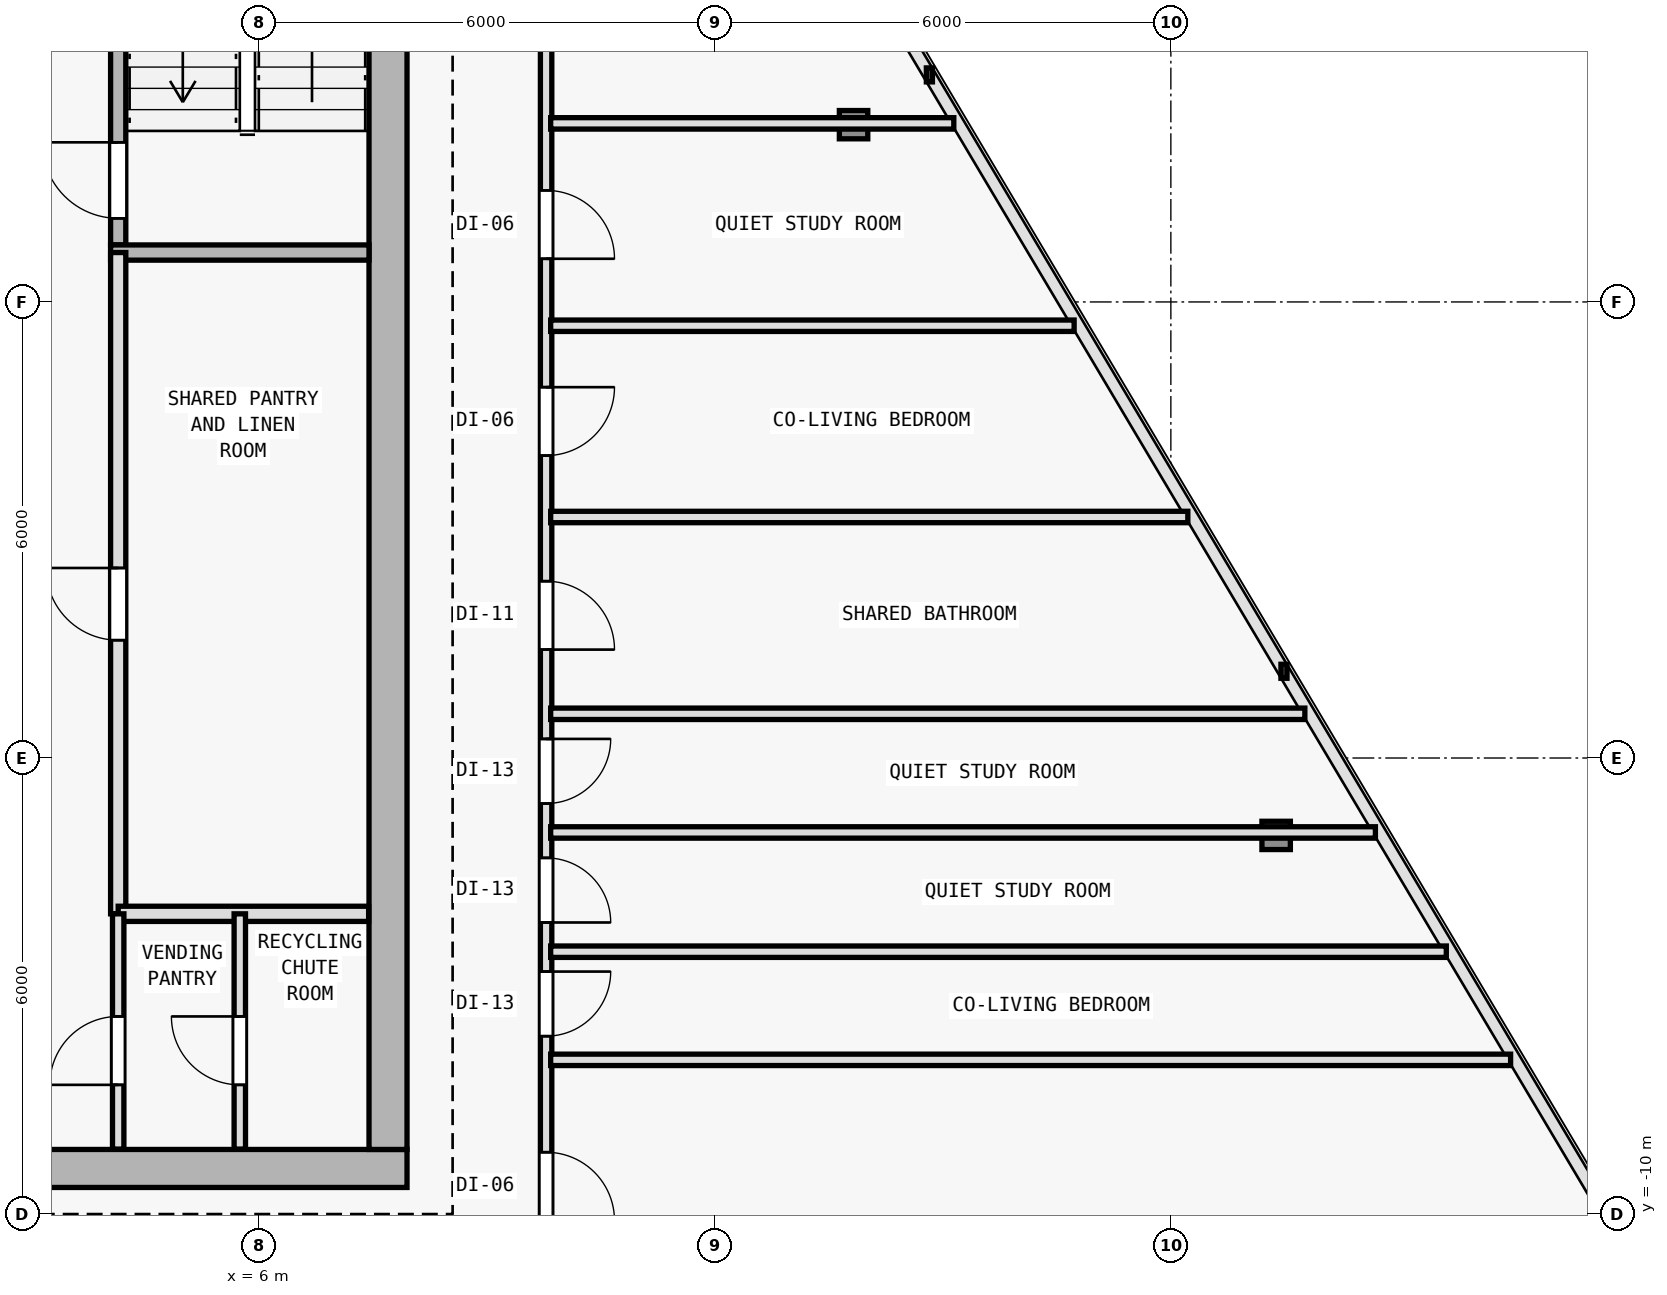
"""IFC4 building model, lengths in metres.
Left out: names, types, materials, properties, quantities, classifications, styles, units other than length and angle.
Written with IfcOpenShell. Run it as: python <this file> out.ifc"""

import sys

from ifc_helpers import new_model, si_unit, direction, frame, frame_2d, origin, origin_2d, place, context, subcontext, project, spatial, rectangle, i_section, extrude, element, fill, save


model = new_model("IFC4")
c1 = context("Model", 3, precision=1e-05, world=origin(), true_north=direction((0.0, 1.0)))
c2 = subcontext(c1, "Body", "Model", "MODEL_VIEW")
j1 = project(units=[si_unit("LENGTHUNIT", "METRE"), si_unit("PLANEANGLEUNIT", "RADIAN")], contexts=[c1])
p1 = place(None, origin())
s1 = spatial("IfcSite", under=j1, at=p1, CompositionType="ELEMENT")
p2 = place(p1, origin())
s2 = spatial("IfcBuilding", under=s1, at=p2, CompositionType="ELEMENT")
p3 = place(p2, frame((0.0, 0.0, 258.0)))
s3 = spatial("IfcBuildingStorey", under=s2, at=p3, CompositionType="ELEMENT", Elevation=258.0)
for number, where, z_axis, x_axis in (
    (1, (7.7, -9.4, 0.0), (0.0, 0.0, 1.0), (1.0, 0.0, 0.0)),
    (2, (7.7, 0.4, 0.0), (0.0, 0.0, 1.0), (1.0, 0.0, 0.0)),
):
    element("IfcColumn", number, at=place(p3, frame(where, z_axis=z_axis, x_axis=x_axis)), inside=s3, PredefinedType="COLUMN", context=c2, shape_type="SweptSolid", body=[
        extrude(i_section(OverallWidth=0.374, OverallDepth=0.372, WebThickness=0.012, FlangeThickness=0.02, FilletRadius=0.015, at=origin_2d()), origin(), (0.0, 0.0, 1.0), 3.6),
    ])
p4 = place(p3, frame((19.385, -5.018, 0.006), z_axis=(-0.026107436898, 0.021620221181, 0.999425318758), x_axis=(-0.637813971185, -0.770190455771, 0.0)))
e3 = element("IfcColumn", 3, at=p4, inside=s3, PredefinedType="COLUMN", context=c2, shape_type="SweptSolid", body=[
    extrude(i_section(OverallWidth=0.374, OverallDepth=0.372, WebThickness=0.012, FlangeThickness=0.02, FilletRadius=0.015, at=origin_2d()), origin(), (0.0, 0.0, 1.0), 3.591),
])
p5 = place(p3, frame((13.825, 4.332, 0.006), z_axis=(-0.018907326549, 0.00952167524, 0.999775900241), x_axis=(-0.449781931574, -0.893138406984, 0.0)))
e4 = element("IfcColumn", 4, at=p5, inside=s3, PredefinedType="COLUMN", context=c2, shape_type="SweptSolid", body=[
    extrude(i_section(OverallWidth=0.374, OverallDepth=0.372, WebThickness=0.012, FlangeThickness=0.02, FilletRadius=0.015, at=origin_2d()), origin(), (0.0, 0.0, 1.0), 3.59),
])
p6 = place(p3, frame((-7.95, -9.4, 0.0), z_axis=(0.0, 0.0, 1.0), x_axis=(1.0, 0.0, 0.0)))
e5 = element("IfcWall", 5, at=p6, inside=s3, PredefinedType="SHEAR", context=c2, shape_type="SweptSolid", body=[
    extrude(rectangle(XDim=15.9, YDim=0.5, at=frame_2d((7.95, 0.0))), origin(), (0.0, 0.0, 1.0), 3.35),
])
p7 = place(p6, frame((9.6, 0.0, 0.0)))
e6 = element("IfcOpeningElement", 6, at=p7, cuts=e5, PredefinedType="OPENING", context=c2, shape_type="SweptSolid", body=[
    extrude(rectangle(XDim=1.5, YDim=2.2, at=frame_2d((0.75, 1.1))), frame((0.0, 0.26, 0.0), z_axis=(0.0, -1.0, 0.0), x_axis=(1.0, 0.0, 0.0)), (0.0, 0.0, 1.0), 0.52),
])
p8 = place(p3, frame((7.7, 9.95, 0.0), z_axis=(0.0, 0.0, 1.0), x_axis=(0.0, -1.0, 0.0)))
e7 = element("IfcWall", 7, at=p8, inside=s3, PredefinedType="SHEAR", context=c2, shape_type="SweptSolid", body=[
    extrude(rectangle(XDim=19.1, YDim=0.5, at=frame_2d((9.55, 0.0))), origin(), (0.0, 0.0, 1.0), 3.35),
])
p9 = place(p3, frame((4.15, 2.75, 0.0), z_axis=(0.0, 0.0, 1.0), x_axis=(0.0, 1.0, 0.0)))
e8 = element("IfcWall", 8, at=p9, inside=s3, PredefinedType="SOLIDWALL", context=c2, shape_type="SweptSolid", body=[
    extrude(rectangle(XDim=7.2, YDim=0.2, at=frame_2d((3.6, 0.0))), origin(), (0.0, 0.0, 1.0), 3.35),
])
p10 = place(p9, frame((0.35, 0.0, 0.0)))
e9 = element("IfcOpeningElement", 9, at=p10, cuts=e8, PredefinedType="OPENING", context=c2, shape_type="SweptSolid", body=[
    extrude(rectangle(XDim=1.0, YDim=2.15, at=frame_2d((0.5, 1.075))), frame((0.0, 0.11, 0.0), z_axis=(0.0, -1.0, 0.0), x_axis=(1.0, 0.0, 0.0)), (0.0, 0.0, 1.0), 0.22),
])
p11 = place(p3, frame((4.05, 2.65, 0.0), z_axis=(0.0, 0.0, 1.0), x_axis=(1.0, 0.0, 0.0)))
e10 = element("IfcWall", 10, at=p11, inside=s3, PredefinedType="SOLIDWALL", context=c2, shape_type="SweptSolid", body=[
    extrude(rectangle(XDim=3.4, YDim=0.2, at=frame_2d((1.7, 0.0))), origin(), (0.0, 0.0, 1.0), 3.35),
])
p12 = place(p3, frame((4.15, -6.05, 0.0), z_axis=(0.0, 0.0, 1.0), x_axis=(0.0, 1.0, 0.0)))
e11 = element("IfcWall", 11, at=p12, inside=s3, PredefinedType="SOLIDWALL", context=c2, shape_type="SweptSolid", body=[
    extrude(rectangle(XDim=8.7, YDim=0.2, at=frame_2d((4.35, 0.0))), origin(), (0.0, 0.0, 1.0), 3.35),
])
p13 = place(p12, frame((3.6, 0.0, 0.0)))
e12 = element("IfcOpeningElement", 12, at=p13, cuts=e11, PredefinedType="OPENING", context=c2, shape_type="SweptSolid", body=[
    extrude(rectangle(XDim=0.95, YDim=2.1, at=frame_2d((0.475, 1.05))), frame((0.0, 0.11, 0.0), z_axis=(0.0, -1.0, 0.0), x_axis=(1.0, 0.0, 0.0)), (0.0, 0.0, 1.0), 0.22),
])
p14 = place(p3, frame((4.15, -6.05, 0.0), z_axis=(0.0, 0.0, 1.0), x_axis=(1.0, 0.0, 0.0)))
e13 = element("IfcWall", 13, at=p14, inside=s3, PredefinedType="SOLIDWALL", context=c2, shape_type="SweptSolid", body=[
    extrude(rectangle(XDim=3.295, YDim=0.2, at=frame_2d((1.647, 0.0))), origin(), (0.0, 0.0, 1.0), 3.35),
])
p15 = place(p3, frame((4.15, -9.145, 0.0), z_axis=(0.0, 0.0, 1.0), x_axis=(0.0, 1.0, 0.0)))
e14 = element("IfcWall", 14, at=p15, inside=s3, PredefinedType="PARTITIONING", context=c2, shape_type="SweptSolid", body=[
    extrude(rectangle(XDim=3.095, YDim=0.15, at=frame_2d((1.547, 0.0))), origin(), (0.0, 0.0, 1.0), 3.35),
])
p16 = place(p15, frame((0.845, 0.0, 0.0)))
e15 = element("IfcOpeningElement", 15, at=p16, cuts=e14, PredefinedType="OPENING", context=c2, shape_type="SweptSolid", body=[
    extrude(rectangle(XDim=0.9, YDim=2.1, at=frame_2d((0.45, 1.05))), frame((0.0, 0.085, 0.0), z_axis=(0.0, -1.0, 0.0), x_axis=(1.0, 0.0, 0.0)), (0.0, 0.0, 1.0), 0.17),
])
p17 = place(p3, frame((5.75, -9.145, 0.0), z_axis=(0.0, 0.0, 1.0), x_axis=(0.0, 1.0, 0.0)))
e16 = element("IfcWall", 16, at=p17, inside=s3, PredefinedType="PARTITIONING", context=c2, shape_type="SweptSolid", body=[
    extrude(rectangle(XDim=3.095, YDim=0.15, at=frame_2d((1.547, 0.0))), origin(), (0.0, 0.0, 1.0), 3.35),
])
p18 = place(p17, frame((0.845, 0.0, 0.0)))
e17 = element("IfcOpeningElement", 17, at=p18, cuts=e16, PredefinedType="OPENING", context=c2, shape_type="SweptSolid", body=[
    extrude(rectangle(XDim=0.9, YDim=2.1, at=frame_2d((0.45, 1.05))), frame((0.0, 0.085, 0.0), z_axis=(0.0, -1.0, 0.0), x_axis=(1.0, 0.0, 0.0)), (0.0, 0.0, 1.0), 0.17),
])
p19 = place(p3, frame((9.78, 8.226, 0.0), z_axis=(0.0, 0.0, 1.0), x_axis=(0.0, -1.0, 0.0)))
e18 = element("IfcWall", 18, at=p19, inside=s3, PredefinedType="PARTITIONING", context=c2, shape_type="SweptSolid", body=[
    extrude(rectangle(XDim=19.706, YDim=0.15, at=frame_2d((9.853, 0.0))), origin(), (0.0, 0.0, 1.0), 2.725),
])
p20 = place(p19, frame((17.412, 0.0, 0.0)))
e19 = element("IfcOpeningElement", 19, at=p20, cuts=e18, PredefinedType="OPENING", context=c2, shape_type="SweptSolid", body=[
    extrude(rectangle(XDim=0.9, YDim=2.1, at=frame_2d((0.45, 1.05))), frame((0.0, 0.085, 0.0), z_axis=(0.0, -1.0, 0.0), x_axis=(1.0, 0.0, 0.0)), (0.0, 0.0, 1.0), 0.17),
])
p21 = place(p19, frame((15.036, 0.0, 0.0)))
e20 = element("IfcOpeningElement", 20, at=p21, cuts=e18, PredefinedType="OPENING", context=c2, shape_type="SweptSolid", body=[
    extrude(rectangle(XDim=0.85, YDim=2.1, at=frame_2d((0.425, 1.05))), frame((0.0, 0.085, 0.0), z_axis=(0.0, -1.0, 0.0), x_axis=(1.0, 0.0, 0.0)), (0.0, 0.0, 1.0), 0.17),
])
p22 = place(p19, frame((13.54, 0.0, 0.0)))
e21 = element("IfcOpeningElement", 21, at=p22, cuts=e18, PredefinedType="OPENING", context=c2, shape_type="SweptSolid", body=[
    extrude(rectangle(XDim=0.85, YDim=2.1, at=frame_2d((0.425, 1.05))), frame((0.0, 0.085, 0.0), z_axis=(0.0, -1.0, 0.0), x_axis=(1.0, 0.0, 0.0)), (0.0, 0.0, 1.0), 0.17),
])
p23 = place(p19, frame((11.975, 0.0, 0.0)))
e22 = element("IfcOpeningElement", 22, at=p23, cuts=e18, PredefinedType="OPENING", context=c2, shape_type="SweptSolid", body=[
    extrude(rectangle(XDim=0.85, YDim=2.1, at=frame_2d((0.425, 1.05))), frame((0.0, 0.085, 0.0), z_axis=(0.0, -1.0, 0.0), x_axis=(1.0, 0.0, 0.0)), (0.0, 0.0, 1.0), 0.17),
])
p24 = place(p19, frame((9.9, 0.0, 0.0)))
e23 = element("IfcOpeningElement", 23, at=p24, cuts=e18, PredefinedType="OPENING", context=c2, shape_type="SweptSolid", body=[
    extrude(rectangle(XDim=0.9, YDim=2.1, at=frame_2d((0.45, 1.05))), frame((0.0, 0.085, 0.0), z_axis=(0.0, -1.0, 0.0), x_axis=(1.0, 0.0, 0.0)), (0.0, 0.0, 1.0), 0.17),
])
p25 = place(p19, frame((7.347, 0.0, 0.0)))
e24 = element("IfcOpeningElement", 24, at=p25, cuts=e18, PredefinedType="OPENING", context=c2, shape_type="SweptSolid", body=[
    extrude(rectangle(XDim=0.9, YDim=2.1, at=frame_2d((0.45, 1.05))), frame((0.0, 0.085, 0.0), z_axis=(0.0, -1.0, 0.0), x_axis=(1.0, 0.0, 0.0)), (0.0, 0.0, 1.0), 0.17),
])
p26 = place(p19, frame((4.758, 0.0, 0.0)))
e25 = element("IfcOpeningElement", 25, at=p26, cuts=e18, PredefinedType="OPENING", context=c2, shape_type="SweptSolid", body=[
    extrude(rectangle(XDim=0.9, YDim=2.1, at=frame_2d((0.45, 1.05))), frame((0.0, 0.085, 0.0), z_axis=(0.0, -1.0, 0.0), x_axis=(1.0, 0.0, 0.0)), (0.0, 0.0, 1.0), 0.17),
])
p27 = place(p3, frame((9.84, -4.979, 0.0), z_axis=(0.0, 0.0, 1.0), x_axis=(1.0, 0.0, 0.0)))
e26 = element("IfcWall", 26, at=p27, inside=s3, PredefinedType="PARTITIONING", context=c2, shape_type="SweptSolid", body=[
    extrude(rectangle(XDim=10.851, YDim=0.15, at=frame_2d((5.426, 0.0))), origin(), (0.0, 0.0, 1.0), 2.825),
])
p28 = place(p3, frame((9.84, 4.349, 0.0), z_axis=(0.0, 0.0, 1.0), x_axis=(1.0, 0.0, 0.0)))
e27 = element("IfcWall", 27, at=p28, inside=s3, PredefinedType="PARTITIONING", context=c2, shape_type="SweptSolid", body=[
    extrude(rectangle(XDim=5.304, YDim=0.15, at=frame_2d((2.652, 0.0))), origin(), (0.0, 0.0, 1.0), 2.875),
])
p29 = place(p3, frame((9.84, -7.971, 0.0), z_axis=(0.0, 0.0, 1.0), x_axis=(1.0, 0.0, 0.0)))
e28 = element("IfcWall", 28, at=p29, inside=s3, PredefinedType="PARTITIONING", context=c2, shape_type="SweptSolid", body=[
    extrude(rectangle(XDim=12.63, YDim=0.15, at=frame_2d((6.315, 0.0))), origin(), (0.0, 0.0, 1.0), 2.875),
])
p30 = place(p3, frame((9.84, -0.829, 0.0), z_axis=(0.0, 0.0, 1.0), x_axis=(1.0, 0.0, 0.0)))
e29 = element("IfcWall", 29, at=p30, inside=s3, PredefinedType="PARTITIONING", context=c2, shape_type="SweptSolid", body=[
    extrude(rectangle(XDim=8.383, YDim=0.15, at=frame_2d((4.192, 0.0))), origin(), (0.0, 0.0, 1.0), 2.825),
])
p31 = place(p3, frame((9.84, -6.548, 0.0), z_axis=(0.0, 0.0, 1.0), x_axis=(1.0, 0.0, 0.0)))
e30 = element("IfcWall", 30, at=p31, inside=s3, PredefinedType="PARTITIONING", context=c2, shape_type="SweptSolid", body=[
    extrude(rectangle(XDim=11.784, YDim=0.15, at=frame_2d((5.892, 0.0))), origin(), (0.0, 0.0, 1.0), 2.825),
])
p32 = place(p3, frame((9.84, -3.418, 0.0), z_axis=(0.0, 0.0, 1.0), x_axis=(1.0, 0.0, 0.0)))
e31 = element("IfcWall", 31, at=p32, inside=s3, PredefinedType="PARTITIONING", context=c2, shape_type="SweptSolid", body=[
    extrude(rectangle(XDim=9.923, YDim=0.15, at=frame_2d((4.961, 0.0))), origin(), (0.0, 0.0, 1.0), 2.825),
])
p33 = place(p3, frame((9.84, 1.687, 0.0), z_axis=(0.0, 0.0, 1.0), x_axis=(1.0, 0.0, 0.0)))
e32 = element("IfcWall", 32, at=p33, inside=s3, PredefinedType="PARTITIONING", context=c2, shape_type="SweptSolid", body=[
    extrude(rectangle(XDim=6.887, YDim=0.15, at=frame_2d((3.444, 0.0))), origin(), (0.0, 0.0, 1.0), 2.825),
])
p34 = place(p10, origin())
e33 = element("IfcDoor", 33, at=p34, inside=s3, OperationType="SINGLE_SWING_RIGHT", PredefinedType="DOOR", context=c2, shape_type="SweptSolid", body=[
    extrude(rectangle(XDim=1.0, YDim=2.15, at=frame_2d((0.5, 1.075))), frame((0.0, 0.025, 0.0), z_axis=(0.0, -1.0, 0.0), x_axis=(1.0, 0.0, 0.0)), (0.0, 0.0, 1.0), 0.05),
])
fill(e9, e33)
p35 = place(p13, origin())
e34 = element("IfcDoor", 34, at=p35, inside=s3, OperationType="SINGLE_SWING_RIGHT", PredefinedType="DOOR", context=c2, shape_type="SweptSolid", body=[
    extrude(rectangle(XDim=0.95, YDim=2.1, at=frame_2d((0.475, 1.05))), frame((0.0, 0.025, 0.0), z_axis=(0.0, -1.0, 0.0), x_axis=(1.0, 0.0, 0.0)), (0.0, 0.0, 1.0), 0.05),
])
fill(e12, e34)
p36 = place(p16, origin())
e35 = element("IfcDoor", 35, at=p36, inside=s3, OperationType="SINGLE_SWING_LEFT", PredefinedType="DOOR", context=c2, shape_type="SweptSolid", body=[
    extrude(rectangle(XDim=0.9, YDim=2.1, at=frame_2d((0.45, 1.05))), frame((0.0, 0.025, 0.0), z_axis=(0.0, -1.0, 0.0), x_axis=(1.0, 0.0, 0.0)), (0.0, 0.0, 1.0), 0.05),
])
fill(e15, e35)
p37 = place(p18, origin())
e36 = element("IfcDoor", 36, at=p37, inside=s3, OperationType="SINGLE_SWING_RIGHT", PredefinedType="DOOR", context=c2, shape_type="SweptSolid", body=[
    extrude(rectangle(XDim=0.9, YDim=2.1, at=frame_2d((0.45, 1.05))), frame((0.0, 0.025, 0.0), z_axis=(0.0, -1.0, 0.0), x_axis=(1.0, 0.0, 0.0)), (0.0, 0.0, 1.0), 0.05),
])
fill(e17, e36)
p38 = place(p20, origin())
e37 = element("IfcDoor", 37, at=p38, inside=s3, OperationType="SINGLE_SWING_RIGHT", PredefinedType="DOOR", context=c2, shape_type="SweptSolid", body=[
    extrude(rectangle(XDim=0.9, YDim=2.1, at=frame_2d((0.45, 1.05))), frame((0.0, 0.025, 0.0), z_axis=(0.0, -1.0, 0.0), x_axis=(1.0, 0.0, 0.0)), (0.0, 0.0, 1.0), 0.05),
])
fill(e19, e37)
p39 = place(p21, origin())
e38 = element("IfcDoor", 38, at=p39, inside=s3, OperationType="SINGLE_SWING_LEFT", PredefinedType="DOOR", context=c2, shape_type="SweptSolid", body=[
    extrude(rectangle(XDim=0.85, YDim=2.1, at=frame_2d((0.425, 1.05))), frame((0.0, 0.025, 0.0), z_axis=(0.0, -1.0, 0.0), x_axis=(1.0, 0.0, 0.0)), (0.0, 0.0, 1.0), 0.05),
])
fill(e20, e38)
p40 = place(p22, origin())
e39 = element("IfcDoor", 39, at=p40, inside=s3, OperationType="SINGLE_SWING_RIGHT", PredefinedType="DOOR", context=c2, shape_type="SweptSolid", body=[
    extrude(rectangle(XDim=0.85, YDim=2.1, at=frame_2d((0.425, 1.05))), frame((0.0, 0.025, 0.0), z_axis=(0.0, -1.0, 0.0), x_axis=(1.0, 0.0, 0.0)), (0.0, 0.0, 1.0), 0.05),
])
fill(e21, e39)
p41 = place(p23, origin())
e40 = element("IfcDoor", 40, at=p41, inside=s3, OperationType="SINGLE_SWING_LEFT", PredefinedType="DOOR", context=c2, shape_type="SweptSolid", body=[
    extrude(rectangle(XDim=0.85, YDim=2.1, at=frame_2d((0.425, 1.05))), frame((0.0, 0.025, 0.0), z_axis=(0.0, -1.0, 0.0), x_axis=(1.0, 0.0, 0.0)), (0.0, 0.0, 1.0), 0.05),
])
fill(e22, e40)
p42 = place(p24, origin())
e41 = element("IfcDoor", 41, at=p42, inside=s3, OperationType="SINGLE_SWING_RIGHT", PredefinedType="DOOR", context=c2, shape_type="SweptSolid", body=[
    extrude(rectangle(XDim=0.9, YDim=2.1, at=frame_2d((0.45, 1.05))), frame((0.0, 0.025, 0.0), z_axis=(0.0, -1.0, 0.0), x_axis=(1.0, 0.0, 0.0)), (0.0, 0.0, 1.0), 0.05),
])
fill(e23, e41)
p43 = place(p25, origin())
e42 = element("IfcDoor", 42, at=p43, inside=s3, OperationType="SINGLE_SWING_LEFT", PredefinedType="DOOR", context=c2, shape_type="SweptSolid", body=[
    extrude(rectangle(XDim=0.9, YDim=2.1, at=frame_2d((0.45, 1.05))), frame((0.0, 0.025, 0.0), z_axis=(0.0, -1.0, 0.0), x_axis=(1.0, 0.0, 0.0)), (0.0, 0.0, 1.0), 0.05),
])
fill(e24, e42)
p44 = place(p26, origin())
e43 = element("IfcDoor", 43, at=p44, inside=s3, OperationType="SINGLE_SWING_RIGHT", PredefinedType="DOOR", context=c2, shape_type="SweptSolid", body=[
    extrude(rectangle(XDim=0.9, YDim=2.1, at=frame_2d((0.45, 1.05))), frame((0.0, 0.025, 0.0), z_axis=(0.0, -1.0, 0.0), x_axis=(1.0, 0.0, 0.0)), (0.0, 0.0, 1.0), 0.05),
])
fill(e25, e43)
save(model, sys.argv[1])
